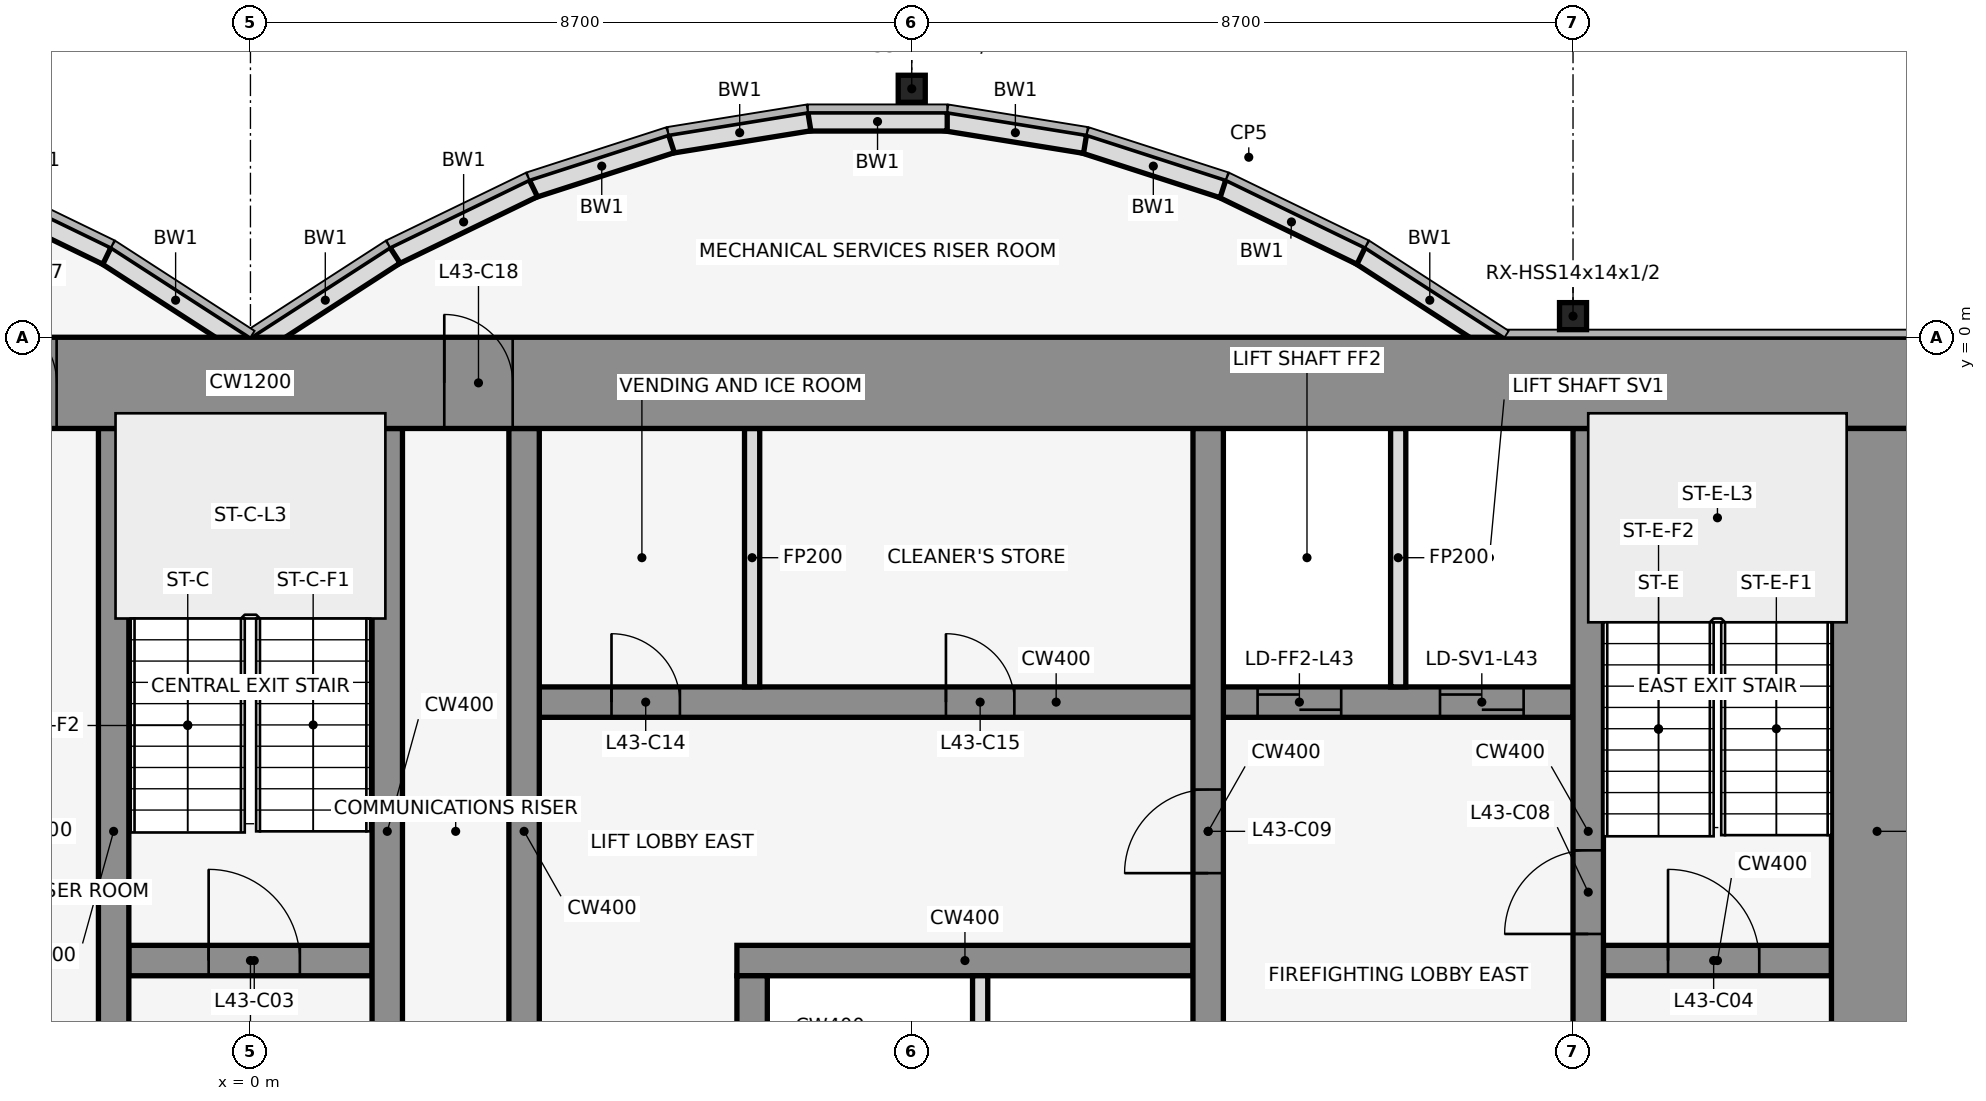
"""IFC4 building model, lengths in metres.
Left out: names, types, materials, properties, quantities, classifications, styles, units other than length and angle.
Written with IfcOpenShell. Run it as: python <this file> out.ifc"""

import sys

from ifc_helpers import new_model, si_unit, direction, frame, frame_2d, origin, origin_2d, place, context, subcontext, project, spatial, rectangle, hollow_rectangle, extrude, element, fill, save


model = new_model("IFC4")
c1 = context("Model", 3, precision=1e-05, world=origin(), true_north=direction((0.0, 1.0)))
c2 = subcontext(c1, "Body", "Model", "MODEL_VIEW")
j1 = project(units=[si_unit("LENGTHUNIT", "METRE"), si_unit("PLANEANGLEUNIT", "RADIAN")], contexts=[c1])
p1 = place(None, origin())
s1 = spatial("IfcSite", under=j1, at=p1, CompositionType="ELEMENT")
p2 = place(p1, origin())
s2 = spatial("IfcBuilding", under=s1, at=p2, CompositionType="ELEMENT")
p3 = place(p2, frame((0.0, 0.0, 195.0)))
s3 = spatial("IfcBuildingStorey", under=s2, at=p3, CompositionType="ELEMENT", Elevation=195.0)
for number, where, z_axis, x_axis in (
    (1, (8.7, 3.269, 0.0), (0.0, 0.0, 1.0), (1.0, 0.0, 0.0)),
    (2, (17.4, 0.278, 0.0), (0.0, 0.0, 1.0), (1.0, 0.0, 0.0)),
):
    element("IfcColumn", number, at=place(p3, frame(where, z_axis=z_axis, x_axis=x_axis)), inside=s3, PredefinedType="COLUMN", context=c2, shape_type="SweptSolid", body=[
        extrude(hollow_rectangle(XDim=0.356, YDim=0.356, WallThickness=0.012, at=origin_2d()), origin(), (0.0, 0.0, 1.0), 4.1),
    ])
p4 = place(p3, frame((16.432, -0.105, 0.0), z_axis=(0.0, 0.0, 1.0), x_axis=(-0.83981312244, 0.542875602121, 0.0)))
e3 = element("IfcWall", 3, at=p4, inside=s3, PredefinedType="STANDARD", context=c2, shape_type="SweptSolid", body=[
    extrude(rectangle(XDim=2.183, YDim=0.25, at=frame_2d((1.091, 0.0))), origin(), (0.0, 0.0, 1.0), 3.95),
])
p5 = place(p3, frame((14.612, 1.073, 0.0), z_axis=(0.0, 0.0, 1.0), x_axis=(-0.89982408427, 0.436252928206, 0.0)))
e4 = element("IfcWall", 4, at=p5, inside=s3, PredefinedType="STANDARD", context=c2, shape_type="SweptSolid", body=[
    extrude(rectangle(XDim=2.038, YDim=0.25, at=frame_2d((1.019, 0.0))), origin(), (0.0, 0.0, 1.0), 3.95),
])
p6 = place(p3, frame((12.795, 1.955, 0.0), z_axis=(0.0, 0.0, 1.0), x_axis=(-0.951495806175, 0.307661714928, 0.0)))
e5 = element("IfcWall", 5, at=p6, inside=s3, PredefinedType="STANDARD", context=c2, shape_type="SweptSolid", body=[
    extrude(rectangle(XDim=1.927, YDim=0.25, at=frame_2d((0.963, 0.0))), origin(), (0.0, 0.0, 1.0), 3.95),
])
p7 = place(p3, frame((10.98, 2.543, 0.0), z_axis=(0.0, 0.0, 1.0), x_axis=(-0.987181718931, 0.159600293885, 0.0)))
e6 = element("IfcWall", 6, at=p7, inside=s3, PredefinedType="STANDARD", context=c2, shape_type="SweptSolid", body=[
    extrude(rectangle(XDim=1.857, YDim=0.25, at=frame_2d((0.929, 0.0))), origin(), (0.0, 0.0, 1.0), 3.95),
])
p8 = place(p3, frame((9.167, 2.838, 0.0), z_axis=(0.0, 0.0, 1.0), x_axis=(-1.0, 0.0, 0.0)))
e7 = element("IfcWall", 7, at=p8, inside=s3, PredefinedType="STANDARD", context=c2, shape_type="SweptSolid", body=[
    extrude(rectangle(XDim=1.833, YDim=0.25, at=frame_2d((0.917, 0.0))), origin(), (0.0, 0.0, 1.0), 3.95),
])
p9 = place(p3, frame((7.353, 2.84, 0.0), z_axis=(0.0, 0.0, 1.0), x_axis=(-0.987181718931, -0.159600293885, 0.0)))
e8 = element("IfcWall", 8, at=p9, inside=s3, PredefinedType="STANDARD", context=c2, shape_type="SweptSolid", body=[
    extrude(rectangle(XDim=1.857, YDim=0.25, at=frame_2d((0.929, 0.0))), origin(), (0.0, 0.0, 1.0), 3.95),
])
p10 = place(p3, frame((5.538, 2.548, 0.0), z_axis=(0.0, 0.0, 1.0), x_axis=(-0.951495806175, -0.307661714928, 0.0)))
e9 = element("IfcWall", 9, at=p10, inside=s3, PredefinedType="STANDARD", context=c2, shape_type="SweptSolid", body=[
    extrude(rectangle(XDim=1.927, YDim=0.25, at=frame_2d((0.963, 0.0))), origin(), (0.0, 0.0, 1.0), 3.95),
])
p11 = place(p3, frame((3.721, 1.962, 0.0), z_axis=(0.0, 0.0, 1.0), x_axis=(-0.89982408427, -0.436252928206, 0.0)))
e10 = element("IfcWall", 10, at=p11, inside=s3, PredefinedType="STANDARD", context=c2, shape_type="SweptSolid", body=[
    extrude(rectangle(XDim=2.038, YDim=0.25, at=frame_2d((1.019, 0.0))), origin(), (0.0, 0.0, 1.0), 3.95),
])
for number, where, z_axis, x_axis in (
    (11, (1.901, 1.08, 0.0), (0.0, 0.0, 1.0), (-0.84, -0.543, 0.0)),
    (12, (-0.068, -0.105, 0.0), (0.0, 0.0, 1.0), (-0.84, 0.543, 0.0)),
):
    element("IfcWall", number, at=place(p3, frame(where, z_axis=z_axis, x_axis=x_axis)), inside=s3, PredefinedType="STANDARD", context=c2, shape_type="SweptSolid", body=[
        extrude(rectangle(XDim=2.183, YDim=0.25, at=frame_2d((1.091, 0.0))), origin(), (0.0, 0.0, 1.0), 3.95),
    ])
p12 = place(p3, frame((-1.888, 1.073, 0.0), z_axis=(0.0, 0.0, 1.0), x_axis=(-0.89982408427, 0.436252928206, 0.0)))
e13 = element("IfcWall", 13, at=p12, inside=s3, PredefinedType="STANDARD", context=c2, shape_type="SweptSolid", body=[
    extrude(rectangle(XDim=2.038, YDim=0.25, at=frame_2d((1.019, 0.0))), origin(), (0.0, 0.0, 1.0), 3.95),
])
p13 = place(p3, frame((-1.6, -8.2, 0.0), z_axis=(0.0, 0.0, 1.0), x_axis=(1.0, 0.0, 0.0)))
e14 = element("IfcWall", 14, at=p13, inside=s3, PredefinedType="SHEAR", context=c2, shape_type="SweptSolid", body=[
    extrude(rectangle(XDim=3.2, YDim=0.4, at=frame_2d((1.6, 0.0))), origin(), (0.0, 0.0, 1.0), 4.1),
])
p14 = place(p13, frame((1.05, 0.0, 0.0)))
e15 = element("IfcOpeningElement", 15, at=p14, cuts=e14, PredefinedType="OPENING", context=c2, shape_type="SweptSolid", body=[
    extrude(rectangle(XDim=1.2, YDim=2.1, at=frame_2d((0.6, 1.05))), frame((0.0, 0.212, 0.0), z_axis=(0.0, -1.0, 0.0), x_axis=(1.0, 0.0, 0.0)), (0.0, 0.0, 1.0), 0.424),
])
p15 = place(p3, frame((6.4, -8.2, 0.0), z_axis=(0.0, 0.0, 1.0), x_axis=(1.0, 0.0, 0.0)))
e16 = element("IfcWall", 16, at=p15, inside=s3, PredefinedType="SHEAR", context=c2, shape_type="SweptSolid", body=[
    extrude(rectangle(XDim=6.0, YDim=0.4, at=frame_2d((3.0, 0.0))), origin(), (0.0, 0.0, 1.0), 4.1),
])
p16 = place(p3, frame((17.8, -8.2, 0.0), z_axis=(0.0, 0.0, 1.0), x_axis=(1.0, 0.0, 0.0)))
e17 = element("IfcWall", 17, at=p16, inside=s3, PredefinedType="SHEAR", context=c2, shape_type="SweptSolid", body=[
    extrude(rectangle(XDim=3.0, YDim=0.4, at=frame_2d((1.5, 0.0))), origin(), (0.0, 0.0, 1.0), 4.1),
])
p17 = place(p16, frame((0.85, 0.0, 0.0)))
e18 = element("IfcOpeningElement", 18, at=p17, cuts=e17, PredefinedType="OPENING", context=c2, shape_type="SweptSolid", body=[
    extrude(rectangle(XDim=1.2, YDim=2.1, at=frame_2d((0.6, 1.05))), frame((0.0, 0.212, 0.0), z_axis=(0.0, -1.0, 0.0), x_axis=(1.0, 0.0, 0.0)), (0.0, 0.0, 1.0), 0.424),
])
p18 = place(p3, frame((3.8, -4.8, 0.0), z_axis=(0.0, 0.0, 1.0), x_axis=(1.0, 0.0, 0.0)))
e19 = element("IfcWall", 19, at=p18, inside=s3, PredefinedType="SHEAR", context=c2, shape_type="SweptSolid", body=[
    extrude(rectangle(XDim=13.6, YDim=0.4, at=frame_2d((6.8, 0.0))), origin(), (0.0, 0.0, 1.0), 4.1),
])
p19 = place(p18, frame((9.45, 0.0, 0.0)))
e20 = element("IfcOpeningElement", 20, at=p19, cuts=e19, PredefinedType="OPENING", context=c2, shape_type="SweptSolid", body=[
    extrude(rectangle(XDim=1.1, YDim=2.1, at=frame_2d((0.55, 1.05))), frame((0.0, 0.212, 0.0), z_axis=(0.0, -1.0, 0.0), x_axis=(1.0, 0.0, 0.0)), (0.0, 0.0, 1.0), 0.424),
])
p20 = place(p18, frame((11.85, 0.0, 0.0)))
e21 = element("IfcOpeningElement", 21, at=p20, cuts=e19, PredefinedType="OPENING", context=c2, shape_type="SweptSolid", body=[
    extrude(rectangle(XDim=1.1, YDim=2.1, at=frame_2d((0.55, 1.05))), frame((0.0, 0.212, 0.0), z_axis=(0.0, -1.0, 0.0), x_axis=(1.0, 0.0, 0.0)), (0.0, 0.0, 1.0), 0.424),
])
p21 = place(p18, frame((0.95, 0.0, 0.0)))
e22 = element("IfcOpeningElement", 22, at=p21, cuts=e19, PredefinedType="OPENING", context=c2, shape_type="SweptSolid", body=[
    extrude(rectangle(XDim=0.9, YDim=2.1, at=frame_2d((0.45, 1.05))), frame((0.0, 0.212, 0.0), z_axis=(0.0, -1.0, 0.0), x_axis=(1.0, 0.0, 0.0)), (0.0, 0.0, 1.0), 0.424),
])
p22 = place(p18, frame((5.35, 0.0, 0.0)))
e23 = element("IfcOpeningElement", 23, at=p22, cuts=e19, PredefinedType="OPENING", context=c2, shape_type="SweptSolid", body=[
    extrude(rectangle(XDim=0.9, YDim=2.1, at=frame_2d((0.45, 1.05))), frame((0.0, 0.212, 0.0), z_axis=(0.0, -1.0, 0.0), x_axis=(1.0, 0.0, 0.0)), (0.0, 0.0, 1.0), 0.424),
])
for number, where, z_axis, x_axis in (
    (24, (-1.8, -11.8, 0.0), (0.0, 0.0, 1.0), (0.0, 1.0, 0.0)),
    (25, (1.8, -11.8, 0.0), (0.0, 0.0, 1.0), (0.0, 1.0, 0.0)),
):
    element("IfcWall", number, at=place(p3, frame(where, z_axis=z_axis, x_axis=x_axis)), inside=s3, PredefinedType="SHEAR", context=c2, shape_type="SweptSolid", body=[
        extrude(rectangle(XDim=10.6, YDim=0.4, at=frame_2d((5.3, 0.0))), origin(), (0.0, 0.0, 1.0), 4.1),
    ])
p23 = place(p3, frame((3.6, -11.8, 0.0), z_axis=(0.0, 0.0, 1.0), x_axis=(0.0, 1.0, 0.0)))
e26 = element("IfcWall", 26, at=p23, inside=s3, PredefinedType="SHEAR", context=c2, shape_type="SweptSolid", body=[
    extrude(rectangle(XDim=10.6, YDim=0.4, at=frame_2d((5.3, 0.0))), origin(), (0.0, 0.0, 1.0), 4.1),
])
p24 = place(p23, frame((1.35, 0.0, 0.0)))
e27 = element("IfcOpeningElement", 27, at=p24, cuts=e26, PredefinedType="OPENING", context=c2, shape_type="SweptSolid", body=[
    extrude(rectangle(XDim=0.9, YDim=2.1, at=frame_2d((0.45, 1.05))), frame((0.0, 0.212, 0.0), z_axis=(0.0, -1.0, 0.0), x_axis=(1.0, 0.0, 0.0)), (0.0, 0.0, 1.0), 0.424),
])
p25 = place(p3, frame((6.6, -11.8, 0.0), z_axis=(0.0, 0.0, 1.0), x_axis=(0.0, 1.0, 0.0)))
e28 = element("IfcWall", 28, at=p25, inside=s3, PredefinedType="SHEAR", context=c2, shape_type="SweptSolid", body=[
    extrude(rectangle(XDim=3.4, YDim=0.4, at=frame_2d((1.7, 0.0))), origin(), (0.0, 0.0, 1.0), 4.1),
])
for number, where, z_axis, x_axis in (
    (29, (6.6, -4.6, 0.0), (0.0, 0.0, 1.0), (0.0, 1.0, 0.0)),
    (30, (9.6, -11.8, 0.0), (0.0, 0.0, 1.0), (0.0, 1.0, 0.0)),
):
    element("IfcWall", number, at=place(p3, frame(where, z_axis=z_axis, x_axis=x_axis)), inside=s3, PredefinedType="PARTITIONING", context=c2, shape_type="SweptSolid", body=[
        extrude(rectangle(XDim=3.4, YDim=0.2, at=frame_2d((1.7, 0.0))), origin(), (0.0, 0.0, 1.0), 2.84),
    ])
p26 = place(p3, frame((12.6, -11.8, 0.0), z_axis=(0.0, 0.0, 1.0), x_axis=(0.0, 1.0, 0.0)))
e31 = element("IfcWall", 31, at=p26, inside=s3, PredefinedType="SHEAR", context=c2, shape_type="SweptSolid", body=[
    extrude(rectangle(XDim=10.6, YDim=0.4, at=frame_2d((5.3, 0.0))), origin(), (0.0, 0.0, 1.0), 4.1),
])
p27 = place(p26, frame((1.25, 0.0, 0.0)))
e32 = element("IfcOpeningElement", 32, at=p27, cuts=e31, PredefinedType="OPENING", context=c2, shape_type="SweptSolid", body=[
    extrude(rectangle(XDim=1.2, YDim=2.1, at=frame_2d((0.6, 1.05))), frame((0.0, 0.212, 0.0), z_axis=(0.0, -1.0, 0.0), x_axis=(1.0, 0.0, 0.0)), (0.0, 0.0, 1.0), 0.424),
])
p28 = place(p26, frame((4.75, 0.0, 0.0)))
e33 = element("IfcOpeningElement", 33, at=p28, cuts=e31, PredefinedType="OPENING", context=c2, shape_type="SweptSolid", body=[
    extrude(rectangle(XDim=1.1, YDim=2.1, at=frame_2d((0.55, 1.05))), frame((0.0, 0.212, 0.0), z_axis=(0.0, -1.0, 0.0), x_axis=(1.0, 0.0, 0.0)), (0.0, 0.0, 1.0), 0.424),
])
p29 = place(p3, frame((15.1, -4.6, 0.0), z_axis=(0.0, 0.0, 1.0), x_axis=(0.0, 1.0, 0.0)))
e34 = element("IfcWall", 34, at=p29, inside=s3, PredefinedType="PARTITIONING", context=c2, shape_type="SweptSolid", body=[
    extrude(rectangle(XDim=3.4, YDim=0.2, at=frame_2d((1.7, 0.0))), origin(), (0.0, 0.0, 1.0), 2.84),
])
p30 = place(p3, frame((17.6, -11.8, 0.0), z_axis=(0.0, 0.0, 1.0), x_axis=(0.0, 1.0, 0.0)))
e35 = element("IfcWall", 35, at=p30, inside=s3, PredefinedType="SHEAR", context=c2, shape_type="SweptSolid", body=[
    extrude(rectangle(XDim=10.6, YDim=0.4, at=frame_2d((5.3, 0.0))), origin(), (0.0, 0.0, 1.0), 4.1),
])
p31 = place(p30, frame((1.25, 0.0, 0.0)))
e36 = element("IfcOpeningElement", 36, at=p31, cuts=e35, PredefinedType="OPENING", context=c2, shape_type="SweptSolid", body=[
    extrude(rectangle(XDim=1.1, YDim=2.1, at=frame_2d((0.55, 1.05))), frame((0.0, 0.212, 0.0), z_axis=(0.0, -1.0, 0.0), x_axis=(1.0, 0.0, 0.0)), (0.0, 0.0, 1.0), 0.424),
])
p32 = place(p30, frame((3.95, 0.0, 0.0)))
e37 = element("IfcOpeningElement", 37, at=p32, cuts=e35, PredefinedType="OPENING", context=c2, shape_type="SweptSolid", body=[
    extrude(rectangle(XDim=1.1, YDim=2.1, at=frame_2d((0.55, 1.05))), frame((0.0, 0.212, 0.0), z_axis=(0.0, -1.0, 0.0), x_axis=(1.0, 0.0, 0.0)), (0.0, 0.0, 1.0), 0.424),
])
p33 = place(p3, frame((-22.0, -0.6, 0.0), z_axis=(0.0, 0.0, 1.0), x_axis=(1.0, 0.0, 0.0)))
e38 = element("IfcWall", 38, at=p33, inside=s3, PredefinedType="SHEAR", context=c2, shape_type="SweptSolid", body=[
    extrude(rectangle(XDim=44.0, YDim=1.2, at=frame_2d((22.0, 0.0))), origin(), (0.0, 0.0, 1.0), 4.1),
])
p34 = place(p33, frame((18.55, 0.0, 0.0)))
e39 = element("IfcOpeningElement", 39, at=p34, cuts=e38, PredefinedType="OPENING", context=c2, shape_type="SweptSolid", body=[
    extrude(rectangle(XDim=0.9, YDim=2.1, at=frame_2d((0.45, 1.05))), frame((0.0, 0.612, 0.0), z_axis=(0.0, -1.0, 0.0), x_axis=(1.0, 0.0, 0.0)), (0.0, 0.0, 1.0), 1.224),
])
p35 = place(p33, frame((24.55, 0.0, 0.0)))
e40 = element("IfcOpeningElement", 40, at=p35, cuts=e38, PredefinedType="OPENING", context=c2, shape_type="SweptSolid", body=[
    extrude(rectangle(XDim=0.9, YDim=2.1, at=frame_2d((0.45, 1.05))), frame((0.0, 0.612, 0.0), z_axis=(0.0, -1.0, 0.0), x_axis=(1.0, 0.0, 0.0)), (0.0, 0.0, 1.0), 1.224),
])
p36 = place(p3, frame((21.4, -11.8, 0.0), z_axis=(0.0, 0.0, 1.0), x_axis=(0.0, 1.0, 0.0)))
e41 = element("IfcWall", 41, at=p36, inside=s3, PredefinedType="SHEAR", context=c2, shape_type="SweptSolid", body=[
    extrude(rectangle(XDim=10.6, YDim=1.2, at=frame_2d((5.3, 0.0))), origin(), (0.0, 0.0, 1.0), 4.1),
])
p37 = place(p14, origin())
e42 = element("IfcDoor", 42, at=p37, inside=s3, OperationType="SINGLE_SWING_LEFT", PredefinedType="DOOR", context=c2, shape_type="SweptSolid", body=[
    extrude(rectangle(XDim=1.2, YDim=2.1, at=frame_2d((0.6, 1.05))), frame((0.0, 0.025, 0.0), z_axis=(0.0, -1.0, 0.0), x_axis=(1.0, 0.0, 0.0)), (0.0, 0.0, 1.0), 0.05),
])
fill(e15, e42)
p38 = place(p17, origin())
e43 = element("IfcDoor", 43, at=p38, inside=s3, OperationType="SINGLE_SWING_RIGHT", PredefinedType="DOOR", context=c2, shape_type="SweptSolid", body=[
    extrude(rectangle(XDim=1.2, YDim=2.1, at=frame_2d((0.6, 1.05))), frame((0.0, 0.025, 0.0), z_axis=(0.0, -1.0, 0.0), x_axis=(1.0, 0.0, 0.0)), (0.0, 0.0, 1.0), 0.05),
])
fill(e18, e43)
p39 = place(p19, origin())
e44 = element("IfcDoor", 44, at=p39, inside=s3, OperationType="DOUBLE_DOOR_SLIDING", PredefinedType="DOOR", context=c2, shape_type="SweptSolid", body=[
    extrude(rectangle(XDim=1.1, YDim=2.1, at=frame_2d((0.55, 1.05))), frame((0.0, 0.025, 0.0), z_axis=(0.0, -1.0, 0.0), x_axis=(1.0, 0.0, 0.0)), (0.0, 0.0, 1.0), 0.05),
])
fill(e20, e44)
p40 = place(p20, origin())
e45 = element("IfcDoor", 45, at=p40, inside=s3, OperationType="DOUBLE_DOOR_SLIDING", PredefinedType="DOOR", context=c2, shape_type="SweptSolid", body=[
    extrude(rectangle(XDim=1.1, YDim=2.1, at=frame_2d((0.55, 1.05))), frame((0.0, 0.025, 0.0), z_axis=(0.0, -1.0, 0.0), x_axis=(1.0, 0.0, 0.0)), (0.0, 0.0, 1.0), 0.05),
])
fill(e21, e45)
p41 = place(p32, origin())
e46 = element("IfcDoor", 46, at=p41, inside=s3, OperationType="SINGLE_SWING_RIGHT", PredefinedType="DOOR", context=c2, shape_type="SweptSolid", body=[
    extrude(rectangle(XDim=1.1, YDim=2.1, at=frame_2d((0.55, 1.05))), frame((0.0, 0.025, 0.0), z_axis=(0.0, -1.0, 0.0), x_axis=(1.0, 0.0, 0.0)), (0.0, 0.0, 1.0), 0.05),
])
fill(e37, e46)
p42 = place(p28, frame((1.1, 0.0, 0.0), z_axis=(0.0, 0.0, 1.0), x_axis=(-1.0, 0.0, 0.0)))
e47 = element("IfcDoor", 47, at=p42, inside=s3, OperationType="SINGLE_SWING_RIGHT", PredefinedType="DOOR", context=c2, shape_type="SweptSolid", body=[
    extrude(rectangle(XDim=1.1, YDim=2.1, at=frame_2d((0.55, 1.05))), frame((0.0, 0.025, 0.0), z_axis=(0.0, -1.0, 0.0), x_axis=(1.0, 0.0, 0.0)), (0.0, 0.0, 1.0), 0.05),
])
fill(e33, e47)
p43 = place(p21, origin())
e48 = element("IfcDoor", 48, at=p43, inside=s3, OperationType="SINGLE_SWING_RIGHT", PredefinedType="DOOR", context=c2, shape_type="SweptSolid", body=[
    extrude(rectangle(XDim=0.9, YDim=2.1, at=frame_2d((0.45, 1.05))), frame((0.0, 0.025, 0.0), z_axis=(0.0, -1.0, 0.0), x_axis=(1.0, 0.0, 0.0)), (0.0, 0.0, 1.0), 0.05),
])
fill(e22, e48)
p44 = place(p22, origin())
e49 = element("IfcDoor", 49, at=p44, inside=s3, OperationType="SINGLE_SWING_LEFT", PredefinedType="DOOR", context=c2, shape_type="SweptSolid", body=[
    extrude(rectangle(XDim=0.9, YDim=2.1, at=frame_2d((0.45, 1.05))), frame((0.0, 0.025, 0.0), z_axis=(0.0, -1.0, 0.0), x_axis=(1.0, 0.0, 0.0)), (0.0, 0.0, 1.0), 0.05),
])
fill(e23, e49)
p45 = place(p34, origin())
e50 = element("IfcDoor", 50, at=p45, inside=s3, OperationType="SINGLE_SWING_LEFT", PredefinedType="DOOR", context=c2, shape_type="SweptSolid", body=[
    extrude(rectangle(XDim=0.9, YDim=2.1, at=frame_2d((0.45, 1.05))), frame((0.0, 0.025, 0.0), z_axis=(0.0, -1.0, 0.0), x_axis=(1.0, 0.0, 0.0)), (0.0, 0.0, 1.0), 0.05),
])
fill(e39, e50)
p46 = place(p35, origin())
e51 = element("IfcDoor", 51, at=p46, inside=s3, OperationType="SINGLE_SWING_LEFT", PredefinedType="DOOR", context=c2, shape_type="SweptSolid", body=[
    extrude(rectangle(XDim=0.9, YDim=2.1, at=frame_2d((0.45, 1.05))), frame((0.0, 0.025, 0.0), z_axis=(0.0, -1.0, 0.0), x_axis=(1.0, 0.0, 0.0)), (0.0, 0.0, 1.0), 0.05),
])
fill(e40, e51)
save(model, sys.argv[1])
